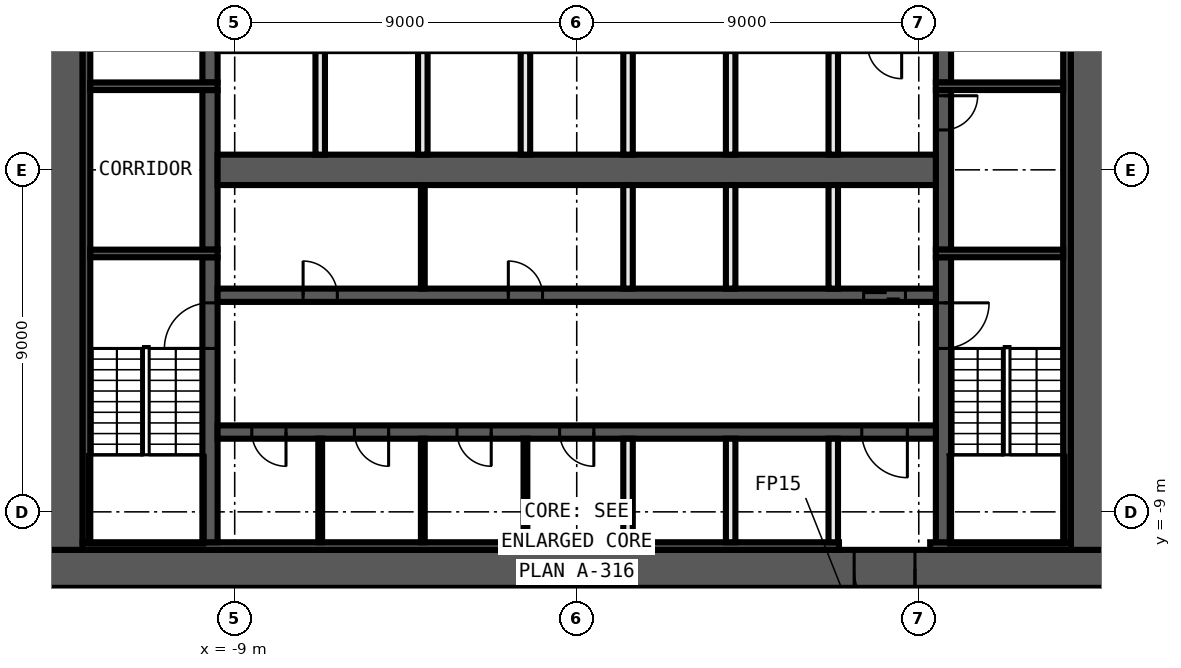
"""IFC4 building model, lengths in metres.
Left out: names, types, materials, properties, quantities, classifications, styles, units other than length and angle.
Written with IfcOpenShell. Run it as: python <this file> out.ifc"""

import sys

from ifc_helpers import new_model, si_unit, direction, frame, frame_2d, origin, place, context, subcontext, project, spatial, rectangle, extrude, element, fill, save


model = new_model("IFC4")
c1 = context("Model", 3, precision=1e-05, world=origin(), true_north=direction((0.0, 1.0)))
c2 = subcontext(c1, "Body", "Model", "MODEL_VIEW")
j1 = project(units=[si_unit("LENGTHUNIT", "METRE"), si_unit("PLANEANGLEUNIT", "RADIAN")], contexts=[c1])
p1 = place(None, origin())
s1 = spatial("IfcSite", under=j1, at=p1, CompositionType="ELEMENT")
p2 = place(p1, origin())
s2 = spatial("IfcBuilding", under=s1, at=p2, CompositionType="ELEMENT")
p3 = place(p2, frame((0.0, 0.0, 117.4)))
s3 = spatial("IfcBuildingStorey", under=s2, at=p3, CompositionType="ELEMENT", Elevation=117.4)
p4 = place(p3, frame((14.0, -10.5, 0.0), z_axis=(0.0, 0.0, 1.0), x_axis=(-1.0, 0.0, 0.0)))
e1 = element("IfcWall", 1, at=p4, inside=s3, PredefinedType="SHEAR", context=c2, shape_type="SweptSolid", body=[
    extrude(rectangle(XDim=28.0, YDim=1.0, at=frame_2d((14.0, 0.0))), origin(), (0.0, 0.0, 1.0), 3.3),
])
p5 = place(p4, frame((5.1, 0.0, 0.0)))
e2 = element("IfcOpeningElement", 2, at=p5, cuts=e1, PredefinedType="OPENING", context=c2, shape_type="SweptSolid", body=[
    extrude(rectangle(XDim=1.6, YDim=2.1, at=frame_2d((0.8, 1.05))), frame((0.0, 0.51, 0.0), z_axis=(0.0, -1.0, 0.0), x_axis=(1.0, 0.0, 0.0)), (0.0, 0.0, 1.0), 1.02),
])
for number, where, z_axis, x_axis in (
    (3, (13.5, 10.0, 0.0), (0.0, 0.0, 1.0), (0.0, -1.0, 0.0)),
    (4, (-13.5, -10.0, 0.0), (0.0, 0.0, 1.0), (0.0, 1.0, 0.0)),
):
    element("IfcWall", number, at=place(p3, frame(where, z_axis=z_axis, x_axis=x_axis)), inside=s3, PredefinedType="SHEAR", context=c2, shape_type="SweptSolid", body=[
        extrude(rectangle(XDim=20.0, YDim=1.0, at=frame_2d((10.0, 0.0))), origin(), (0.0, 0.0, 1.0), 3.3),
    ])
p6 = place(p3, frame((13.0, -9.9, 0.0), z_axis=(0.0, 0.0, 1.0), x_axis=(-1.0, 0.0, 0.0)))
e5 = element("IfcWall", 5, at=p6, inside=s3, PredefinedType="SHEAR", context=c2, shape_type="SweptSolid", body=[
    extrude(rectangle(XDim=3.7, YDim=0.2, at=frame_2d((1.85, 0.0))), origin(), (0.0, 0.0, 1.0), 3.3),
])
p7 = place(p3, frame((6.9, -9.9, 0.0), z_axis=(0.0, 0.0, 1.0), x_axis=(-1.0, 0.0, 0.0)))
e6 = element("IfcWall", 6, at=p7, inside=s3, PredefinedType="SHEAR", context=c2, shape_type="SweptSolid", body=[
    extrude(rectangle(XDim=19.9, YDim=0.2, at=frame_2d((9.95, 0.0))), origin(), (0.0, 0.0, 1.0), 3.3),
])
for number, where, z_axis, x_axis in (
    (7, (12.9, 9.8, 0.0), (0.0, 0.0, 1.0), (0.0, -1.0, 0.0)),
    (8, (-12.9, -9.8, 0.0), (0.0, 0.0, 1.0), (0.0, 1.0, 0.0)),
):
    element("IfcWall", number, at=place(p3, frame(where, z_axis=z_axis, x_axis=x_axis)), inside=s3, PredefinedType="SHEAR", context=c2, shape_type="SweptSolid", body=[
        extrude(rectangle(XDim=19.6, YDim=0.2, at=frame_2d((9.8, 0.0))), origin(), (0.0, 0.0, 1.0), 3.3),
    ])
p8 = place(p3, frame((9.65, -2.3, 0.0), z_axis=(0.0, 0.0, 1.0), x_axis=(0.0, -1.0, 0.0)))
e9 = element("IfcWall", 9, at=p8, inside=s3, PredefinedType="SHEAR", context=c2, shape_type="SweptSolid", body=[
    extrude(rectangle(XDim=7.5, YDim=0.4, at=frame_2d((3.75, 0.0))), origin(), (0.0, 0.0, 1.0), 3.3),
])
p9 = place(p8, frame((1.2, 0.0, 0.0)))
e10 = element("IfcOpeningElement", 10, at=p9, cuts=e9, PredefinedType="OPENING", context=c2, shape_type="SweptSolid", body=[
    extrude(rectangle(XDim=1.2, YDim=2.1, at=frame_2d((0.6, 1.05))), frame((0.0, 0.21, 0.0), z_axis=(0.0, -1.0, 0.0), x_axis=(1.0, 0.0, 0.0)), (0.0, 0.0, 1.0), 0.42),
])
p10 = place(p3, frame((9.65, 2.1, 0.0), z_axis=(0.0, 0.0, 1.0), x_axis=(0.0, -1.0, 0.0)))
e11 = element("IfcWall", 11, at=p10, inside=s3, PredefinedType="SHEAR", context=c2, shape_type="SweptSolid", body=[
    extrude(rectangle(XDim=4.2, YDim=0.4, at=frame_2d((2.1, 0.0))), origin(), (0.0, 0.0, 1.0), 3.3),
])
p11 = place(p10, frame((0.15, 0.0, 0.0)))
e12 = element("IfcOpeningElement", 12, at=p11, cuts=e11, PredefinedType="OPENING", context=c2, shape_type="SweptSolid", body=[
    extrude(rectangle(XDim=0.9, YDim=2.1, at=frame_2d((0.45, 1.05))), frame((0.0, 0.21, 0.0), z_axis=(0.0, -1.0, 0.0), x_axis=(1.0, 0.0, 0.0)), (0.0, 0.0, 1.0), 0.42),
])
p12 = place(p3, frame((9.65, 9.8, 0.0), z_axis=(0.0, 0.0, 1.0), x_axis=(0.0, -1.0, 0.0)))
e13 = element("IfcWall", 13, at=p12, inside=s3, PredefinedType="SHEAR", context=c2, shape_type="SweptSolid", body=[
    extrude(rectangle(XDim=7.5, YDim=0.4, at=frame_2d((3.75, 0.0))), origin(), (0.0, 0.0, 1.0), 3.3),
])
p13 = place(p12, frame((5.1, 0.0, 0.0)))
e14 = element("IfcOpeningElement", 14, at=p13, cuts=e13, PredefinedType="OPENING", context=c2, shape_type="SweptSolid", body=[
    extrude(rectangle(XDim=1.2, YDim=2.1, at=frame_2d((0.6, 1.05))), frame((0.0, 0.21, 0.0), z_axis=(0.0, -1.0, 0.0), x_axis=(1.0, 0.0, 0.0)), (0.0, 0.0, 1.0), 0.42),
])
p14 = place(p3, frame((-9.65, -9.8, 0.0), z_axis=(0.0, 0.0, 1.0), x_axis=(0.0, 1.0, 0.0)))
e15 = element("IfcWall", 15, at=p14, inside=s3, PredefinedType="SHEAR", context=c2, shape_type="SweptSolid", body=[
    extrude(rectangle(XDim=7.5, YDim=0.4, at=frame_2d((3.75, 0.0))), origin(), (0.0, 0.0, 1.0), 3.3),
])
p15 = place(p14, frame((5.1, 0.0, 0.0)))
e16 = element("IfcOpeningElement", 16, at=p15, cuts=e15, PredefinedType="OPENING", context=c2, shape_type="SweptSolid", body=[
    extrude(rectangle(XDim=1.2, YDim=2.1, at=frame_2d((0.6, 1.05))), frame((0.0, 0.21, 0.0), z_axis=(0.0, -1.0, 0.0), x_axis=(1.0, 0.0, 0.0)), (0.0, 0.0, 1.0), 0.42),
])
p16 = place(p3, frame((-9.65, -2.1, 0.0), z_axis=(0.0, 0.0, 1.0), x_axis=(0.0, 1.0, 0.0)))
e17 = element("IfcWall", 17, at=p16, inside=s3, PredefinedType="SHEAR", context=c2, shape_type="SweptSolid", body=[
    extrude(rectangle(XDim=4.2, YDim=0.4, at=frame_2d((2.1, 0.0))), origin(), (0.0, 0.0, 1.0), 3.3),
])
p17 = place(p3, frame((-9.65, 2.3, 0.0), z_axis=(0.0, 0.0, 1.0), x_axis=(0.0, 1.0, 0.0)))
e18 = element("IfcWall", 18, at=p17, inside=s3, PredefinedType="SHEAR", context=c2, shape_type="SweptSolid", body=[
    extrude(rectangle(XDim=7.5, YDim=0.4, at=frame_2d((3.75, 0.0))), origin(), (0.0, 0.0, 1.0), 3.3),
])
p18 = place(p17, frame((1.2, 0.0, 0.0)))
e19 = element("IfcOpeningElement", 19, at=p18, cuts=e18, PredefinedType="OPENING", context=c2, shape_type="SweptSolid", body=[
    extrude(rectangle(XDim=1.2, YDim=2.1, at=frame_2d((0.6, 1.05))), frame((0.0, 0.21, 0.0), z_axis=(0.0, -1.0, 0.0), x_axis=(1.0, 0.0, 0.0)), (0.0, 0.0, 1.0), 0.42),
])
for number, where, z_axis, x_axis in (
    (20, (9.45, 2.2, 0.0), (0.0, 0.0, 1.0), (1.0, 0.0, 0.0)),
    (21, (-9.45, 2.2, 0.0), (0.0, 0.0, 1.0), (-1.0, 0.0, 0.0)),
    (22, (9.45, -2.2, 0.0), (0.0, 0.0, 1.0), (1.0, 0.0, 0.0)),
    (23, (-9.45, -2.2, 0.0), (0.0, 0.0, 1.0), (-1.0, 0.0, 0.0)),
):
    element("IfcWall", number, at=place(p3, frame(where, z_axis=z_axis, x_axis=x_axis)), inside=s3, PredefinedType="SHEAR", context=c2, shape_type="SweptSolid", body=[
        extrude(rectangle(XDim=3.35, YDim=0.2, at=frame_2d((1.675, 0.0))), origin(), (0.0, 0.0, 1.0), 3.3),
    ])
p19 = place(p3, frame((-9.45, -3.3, 0.0), z_axis=(0.0, 0.0, 1.0), x_axis=(1.0, 0.0, 0.0)))
e24 = element("IfcWall", 24, at=p19, inside=s3, PredefinedType="SHEAR", context=c2, shape_type="SweptSolid", body=[
    extrude(rectangle(XDim=18.9, YDim=0.35, at=frame_2d((9.45, 0.0))), origin(), (0.0, 0.0, 1.0), 3.3),
])
p20 = place(p19, frame((17.0, 0.0, 0.0)))
e25 = element("IfcOpeningElement", 25, at=p20, cuts=e24, PredefinedType="OPENING", context=c2, shape_type="SweptSolid", body=[
    extrude(rectangle(XDim=1.1, YDim=2.1, at=frame_2d((0.55, 1.05))), frame((0.0, 0.185, 0.0), z_axis=(0.0, -1.0, 0.0), x_axis=(1.0, 0.0, 0.0)), (0.0, 0.0, 1.0), 0.37),
])
p21 = place(p19, frame((2.25, 0.0, 0.0)))
e26 = element("IfcOpeningElement", 26, at=p21, cuts=e24, PredefinedType="OPENING", context=c2, shape_type="SweptSolid", body=[
    extrude(rectangle(XDim=0.9, YDim=2.1, at=frame_2d((0.45, 1.05))), frame((0.0, 0.185, 0.0), z_axis=(0.0, -1.0, 0.0), x_axis=(1.0, 0.0, 0.0)), (0.0, 0.0, 1.0), 0.37),
])
p22 = place(p19, frame((7.65, 0.0, 0.0)))
e27 = element("IfcOpeningElement", 27, at=p22, cuts=e24, PredefinedType="OPENING", context=c2, shape_type="SweptSolid", body=[
    extrude(rectangle(XDim=0.9, YDim=2.1, at=frame_2d((0.45, 1.05))), frame((0.0, 0.185, 0.0), z_axis=(0.0, -1.0, 0.0), x_axis=(1.0, 0.0, 0.0)), (0.0, 0.0, 1.0), 0.37),
])
p23 = place(p3, frame((9.45, -6.9, 0.0), z_axis=(0.0, 0.0, 1.0), x_axis=(-1.0, 0.0, 0.0)))
e28 = element("IfcWall", 28, at=p23, inside=s3, PredefinedType="SHEAR", context=c2, shape_type="SweptSolid", body=[
    extrude(rectangle(XDim=18.9, YDim=0.35, at=frame_2d((9.45, 0.0))), origin(), (0.0, 0.0, 1.0), 3.3),
])
p24 = place(p23, frame((0.75, 0.0, 0.0)))
e29 = element("IfcOpeningElement", 29, at=p24, cuts=e28, PredefinedType="OPENING", context=c2, shape_type="SweptSolid", body=[
    extrude(rectangle(XDim=1.2, YDim=2.1, at=frame_2d((0.6, 1.05))), frame((0.0, 0.185, 0.0), z_axis=(0.0, -1.0, 0.0), x_axis=(1.0, 0.0, 0.0)), (0.0, 0.0, 1.0), 0.37),
])
p25 = place(p23, frame((17.1, 0.0, 0.0)))
e30 = element("IfcOpeningElement", 30, at=p25, cuts=e28, PredefinedType="OPENING", context=c2, shape_type="SweptSolid", body=[
    extrude(rectangle(XDim=0.9, YDim=2.1, at=frame_2d((0.45, 1.05))), frame((0.0, 0.185, 0.0), z_axis=(0.0, -1.0, 0.0), x_axis=(1.0, 0.0, 0.0)), (0.0, 0.0, 1.0), 0.37),
])
p26 = place(p23, frame((14.4, 0.0, 0.0)))
e31 = element("IfcOpeningElement", 31, at=p26, cuts=e28, PredefinedType="OPENING", context=c2, shape_type="SweptSolid", body=[
    extrude(rectangle(XDim=0.9, YDim=2.1, at=frame_2d((0.45, 1.05))), frame((0.0, 0.185, 0.0), z_axis=(0.0, -1.0, 0.0), x_axis=(1.0, 0.0, 0.0)), (0.0, 0.0, 1.0), 0.37),
])
p27 = place(p23, frame((11.7, 0.0, 0.0)))
e32 = element("IfcOpeningElement", 32, at=p27, cuts=e28, PredefinedType="OPENING", context=c2, shape_type="SweptSolid", body=[
    extrude(rectangle(XDim=0.9, YDim=2.1, at=frame_2d((0.45, 1.05))), frame((0.0, 0.185, 0.0), z_axis=(0.0, -1.0, 0.0), x_axis=(1.0, 0.0, 0.0)), (0.0, 0.0, 1.0), 0.37),
])
p28 = place(p23, frame((9.0, 0.0, 0.0)))
e33 = element("IfcOpeningElement", 33, at=p28, cuts=e28, PredefinedType="OPENING", context=c2, shape_type="SweptSolid", body=[
    extrude(rectangle(XDim=0.9, YDim=2.1, at=frame_2d((0.45, 1.05))), frame((0.0, 0.185, 0.0), z_axis=(0.0, -1.0, 0.0), x_axis=(1.0, 0.0, 0.0)), (0.0, 0.0, 1.0), 0.37),
])
p29 = place(p3, frame((-9.45, 0.0, 0.0), z_axis=(0.0, 0.0, 1.0), x_axis=(1.0, 0.0, 0.0)))
e34 = element("IfcWall", 34, at=p29, inside=s3, PredefinedType="SHEAR", context=c2, shape_type="SweptSolid", body=[
    extrude(rectangle(XDim=18.9, YDim=0.8, at=frame_2d((9.45, 0.0))), origin(), (0.0, 0.0, 1.0), 3.3),
])
for number, where, z_axis, x_axis in (
    (35, (6.75, -9.8, 0.0), (0.0, 0.0, 1.0), (0.0, 1.0, 0.0)),
    (36, (6.75, -3.125, 0.0), (0.0, 0.0, 1.0), (0.0, 1.0, 0.0)),
    (37, (6.75, 0.4, 0.0), (0.0, 0.0, 1.0), (0.0, 1.0, 0.0)),
    (38, (4.05, -9.8, 0.0), (0.0, 0.0, 1.0), (0.0, 1.0, 0.0)),
    (39, (4.05, -3.125, 0.0), (0.0, 0.0, 1.0), (0.0, 1.0, 0.0)),
    (40, (4.05, 0.4, 0.0), (0.0, 0.0, 1.0), (0.0, 1.0, 0.0)),
    (41, (1.35, -9.8, 0.0), (0.0, 0.0, 1.0), (0.0, 1.0, 0.0)),
    (42, (1.35, -3.125, 0.0), (0.0, 0.0, 1.0), (0.0, 1.0, 0.0)),
    (43, (1.35, 0.4, 0.0), (0.0, 0.0, 1.0), (0.0, 1.0, 0.0)),
):
    element("IfcWall", number, at=place(p3, frame(where, z_axis=z_axis, x_axis=x_axis)), inside=s3, PredefinedType="SOLIDWALL", context=c2, shape_type="SweptSolid", body=[
        extrude(rectangle(XDim=2.725, YDim=0.25, at=frame_2d((1.363, 0.0))), origin(), (0.0, 0.0, 1.0), 3.3),
    ])
p30 = place(p3, frame((-1.35, -9.8, 0.0), z_axis=(0.0, 0.0, 1.0), x_axis=(0.0, 1.0, 0.0)))
e44 = element("IfcWall", 44, at=p30, inside=s3, PredefinedType="PARTITIONING", context=c2, shape_type="SweptSolid", body=[
    extrude(rectangle(XDim=2.725, YDim=0.1, at=frame_2d((1.363, 0.0))), origin(), (0.0, 0.0, 1.0), 3.3),
])
p31 = place(p3, frame((-1.35, 0.4, 0.0), z_axis=(0.0, 0.0, 1.0), x_axis=(0.0, 1.0, 0.0)))
e45 = element("IfcWall", 45, at=p31, inside=s3, PredefinedType="SOLIDWALL", context=c2, shape_type="SweptSolid", body=[
    extrude(rectangle(XDim=2.725, YDim=0.25, at=frame_2d((1.363, 0.0))), origin(), (0.0, 0.0, 1.0), 3.3),
])
for number, where, z_axis, x_axis in (
    (46, (-4.05, -9.8, 0.0), (0.0, 0.0, 1.0), (0.0, 1.0, 0.0)),
    (47, (-4.05, -3.125, 0.0), (0.0, 0.0, 1.0), (0.0, 1.0, 0.0)),
):
    element("IfcWall", number, at=place(p3, frame(where, z_axis=z_axis, x_axis=x_axis)), inside=s3, PredefinedType="PARTITIONING", context=c2, shape_type="SweptSolid", body=[
        extrude(rectangle(XDim=2.725, YDim=0.1, at=frame_2d((1.363, 0.0))), origin(), (0.0, 0.0, 1.0), 3.3),
    ])
p32 = place(p3, frame((-4.05, 0.4, 0.0), z_axis=(0.0, 0.0, 1.0), x_axis=(0.0, 1.0, 0.0)))
e48 = element("IfcWall", 48, at=p32, inside=s3, PredefinedType="SOLIDWALL", context=c2, shape_type="SweptSolid", body=[
    extrude(rectangle(XDim=2.725, YDim=0.25, at=frame_2d((1.363, 0.0))), origin(), (0.0, 0.0, 1.0), 3.3),
])
p33 = place(p3, frame((-6.75, -9.8, 0.0), z_axis=(0.0, 0.0, 1.0), x_axis=(0.0, 1.0, 0.0)))
e49 = element("IfcWall", 49, at=p33, inside=s3, PredefinedType="PARTITIONING", context=c2, shape_type="SweptSolid", body=[
    extrude(rectangle(XDim=2.725, YDim=0.1, at=frame_2d((1.363, 0.0))), origin(), (0.0, 0.0, 1.0), 3.3),
])
p34 = place(p3, frame((-6.75, 0.4, 0.0), z_axis=(0.0, 0.0, 1.0), x_axis=(0.0, 1.0, 0.0)))
e50 = element("IfcWall", 50, at=p34, inside=s3, PredefinedType="SOLIDWALL", context=c2, shape_type="SweptSolid", body=[
    extrude(rectangle(XDim=2.725, YDim=0.25, at=frame_2d((1.363, 0.0))), origin(), (0.0, 0.0, 1.0), 3.3),
])
p35 = place(p11, origin())
e51 = element("IfcDoor", 51, at=p35, inside=s3, OperationType="SINGLE_SWING_RIGHT", PredefinedType="DOOR", context=c2, shape_type="SweptSolid", body=[
    extrude(rectangle(XDim=0.9, YDim=2.1, at=frame_2d((0.45, 1.05))), frame((0.0, 0.025, 0.0), z_axis=(0.0, -1.0, 0.0), x_axis=(1.0, 0.0, 0.0)), (0.0, 0.0, 1.0), 0.05),
])
fill(e12, e51)
p36 = place(p20, origin())
e52 = element("IfcDoor", 52, at=p36, inside=s3, OperationType="DOUBLE_DOOR_SLIDING", PredefinedType="DOOR", context=c2, shape_type="SweptSolid", body=[
    extrude(rectangle(XDim=1.1, YDim=2.1, at=frame_2d((0.55, 1.05))), frame((0.0, 0.025, 0.0), z_axis=(0.0, -1.0, 0.0), x_axis=(1.0, 0.0, 0.0)), (0.0, 0.0, 1.0), 0.05),
])
fill(e25, e52)
p37 = place(p5, origin())
e53 = element("IfcDoor", 53, at=p37, inside=s3, OperationType="DOUBLE_DOOR_SINGLE_SWING", PredefinedType="DOOR", context=c2, shape_type="SweptSolid", body=[
    extrude(rectangle(XDim=1.6, YDim=2.1, at=frame_2d((0.8, 1.05))), frame((0.0, 0.025, 0.0), z_axis=(0.0, -1.0, 0.0), x_axis=(1.0, 0.0, 0.0)), (0.0, 0.0, 1.0), 0.05),
])
fill(e2, e53)
p38 = place(p24, origin())
e54 = element("IfcDoor", 54, at=p38, inside=s3, OperationType="SINGLE_SWING_LEFT", PredefinedType="DOOR", context=c2, shape_type="SweptSolid", body=[
    extrude(rectangle(XDim=1.2, YDim=2.1, at=frame_2d((0.6, 1.05))), frame((0.0, 0.025, 0.0), z_axis=(0.0, -1.0, 0.0), x_axis=(1.0, 0.0, 0.0)), (0.0, 0.0, 1.0), 0.05),
])
fill(e29, e54)
p39 = place(p21, origin())
e55 = element("IfcDoor", 55, at=p39, inside=s3, OperationType="SINGLE_SWING_RIGHT", PredefinedType="DOOR", context=c2, shape_type="SweptSolid", body=[
    extrude(rectangle(XDim=0.9, YDim=2.1, at=frame_2d((0.45, 1.05))), frame((0.0, 0.025, 0.0), z_axis=(0.0, -1.0, 0.0), x_axis=(1.0, 0.0, 0.0)), (0.0, 0.0, 1.0), 0.05),
])
fill(e26, e55)
p40 = place(p22, origin())
e56 = element("IfcDoor", 56, at=p40, inside=s3, OperationType="SINGLE_SWING_LEFT", PredefinedType="DOOR", context=c2, shape_type="SweptSolid", body=[
    extrude(rectangle(XDim=0.9, YDim=2.1, at=frame_2d((0.45, 1.05))), frame((0.0, 0.025, 0.0), z_axis=(0.0, -1.0, 0.0), x_axis=(1.0, 0.0, 0.0)), (0.0, 0.0, 1.0), 0.05),
])
fill(e27, e56)
p41 = place(p25, origin())
e57 = element("IfcDoor", 57, at=p41, inside=s3, OperationType="SINGLE_SWING_RIGHT", PredefinedType="DOOR", context=c2, shape_type="SweptSolid", body=[
    extrude(rectangle(XDim=0.9, YDim=2.1, at=frame_2d((0.45, 1.05))), frame((0.0, 0.025, 0.0), z_axis=(0.0, -1.0, 0.0), x_axis=(1.0, 0.0, 0.0)), (0.0, 0.0, 1.0), 0.05),
])
fill(e30, e57)
p42 = place(p26, origin())
e58 = element("IfcDoor", 58, at=p42, inside=s3, OperationType="SINGLE_SWING_LEFT", PredefinedType="DOOR", context=c2, shape_type="SweptSolid", body=[
    extrude(rectangle(XDim=0.9, YDim=2.1, at=frame_2d((0.45, 1.05))), frame((0.0, 0.025, 0.0), z_axis=(0.0, -1.0, 0.0), x_axis=(1.0, 0.0, 0.0)), (0.0, 0.0, 1.0), 0.05),
])
fill(e31, e58)
p43 = place(p27, origin())
e59 = element("IfcDoor", 59, at=p43, inside=s3, OperationType="SINGLE_SWING_RIGHT", PredefinedType="DOOR", context=c2, shape_type="SweptSolid", body=[
    extrude(rectangle(XDim=0.9, YDim=2.1, at=frame_2d((0.45, 1.05))), frame((0.0, 0.025, 0.0), z_axis=(0.0, -1.0, 0.0), x_axis=(1.0, 0.0, 0.0)), (0.0, 0.0, 1.0), 0.05),
])
fill(e32, e59)
p44 = place(p28, origin())
e60 = element("IfcDoor", 60, at=p44, inside=s3, OperationType="SINGLE_SWING_LEFT", PredefinedType="DOOR", context=c2, shape_type="SweptSolid", body=[
    extrude(rectangle(XDim=0.9, YDim=2.1, at=frame_2d((0.45, 1.05))), frame((0.0, 0.025, 0.0), z_axis=(0.0, -1.0, 0.0), x_axis=(1.0, 0.0, 0.0)), (0.0, 0.0, 1.0), 0.05),
])
fill(e33, e60)
p45 = place(p9, origin())
e61 = element("IfcDoor", 61, at=p45, inside=s3, OperationType="SINGLE_SWING_RIGHT", PredefinedType="DOOR", context=c2, shape_type="SweptSolid", body=[
    extrude(rectangle(XDim=1.2, YDim=2.1, at=frame_2d((0.6, 1.05))), frame((0.0, 0.025, 0.0), z_axis=(0.0, -1.0, 0.0), x_axis=(1.0, 0.0, 0.0)), (0.0, 0.0, 1.0), 0.05),
])
fill(e10, e61)
p46 = place(p15, origin())
e62 = element("IfcDoor", 62, at=p46, inside=s3, OperationType="SINGLE_SWING_LEFT", PredefinedType="DOOR", context=c2, shape_type="SweptSolid", body=[
    extrude(rectangle(XDim=1.2, YDim=2.1, at=frame_2d((0.6, 1.05))), frame((0.0, 0.025, 0.0), z_axis=(0.0, -1.0, 0.0), x_axis=(1.0, 0.0, 0.0)), (0.0, 0.0, 1.0), 0.05),
])
fill(e16, e62)
save(model, sys.argv[1])
